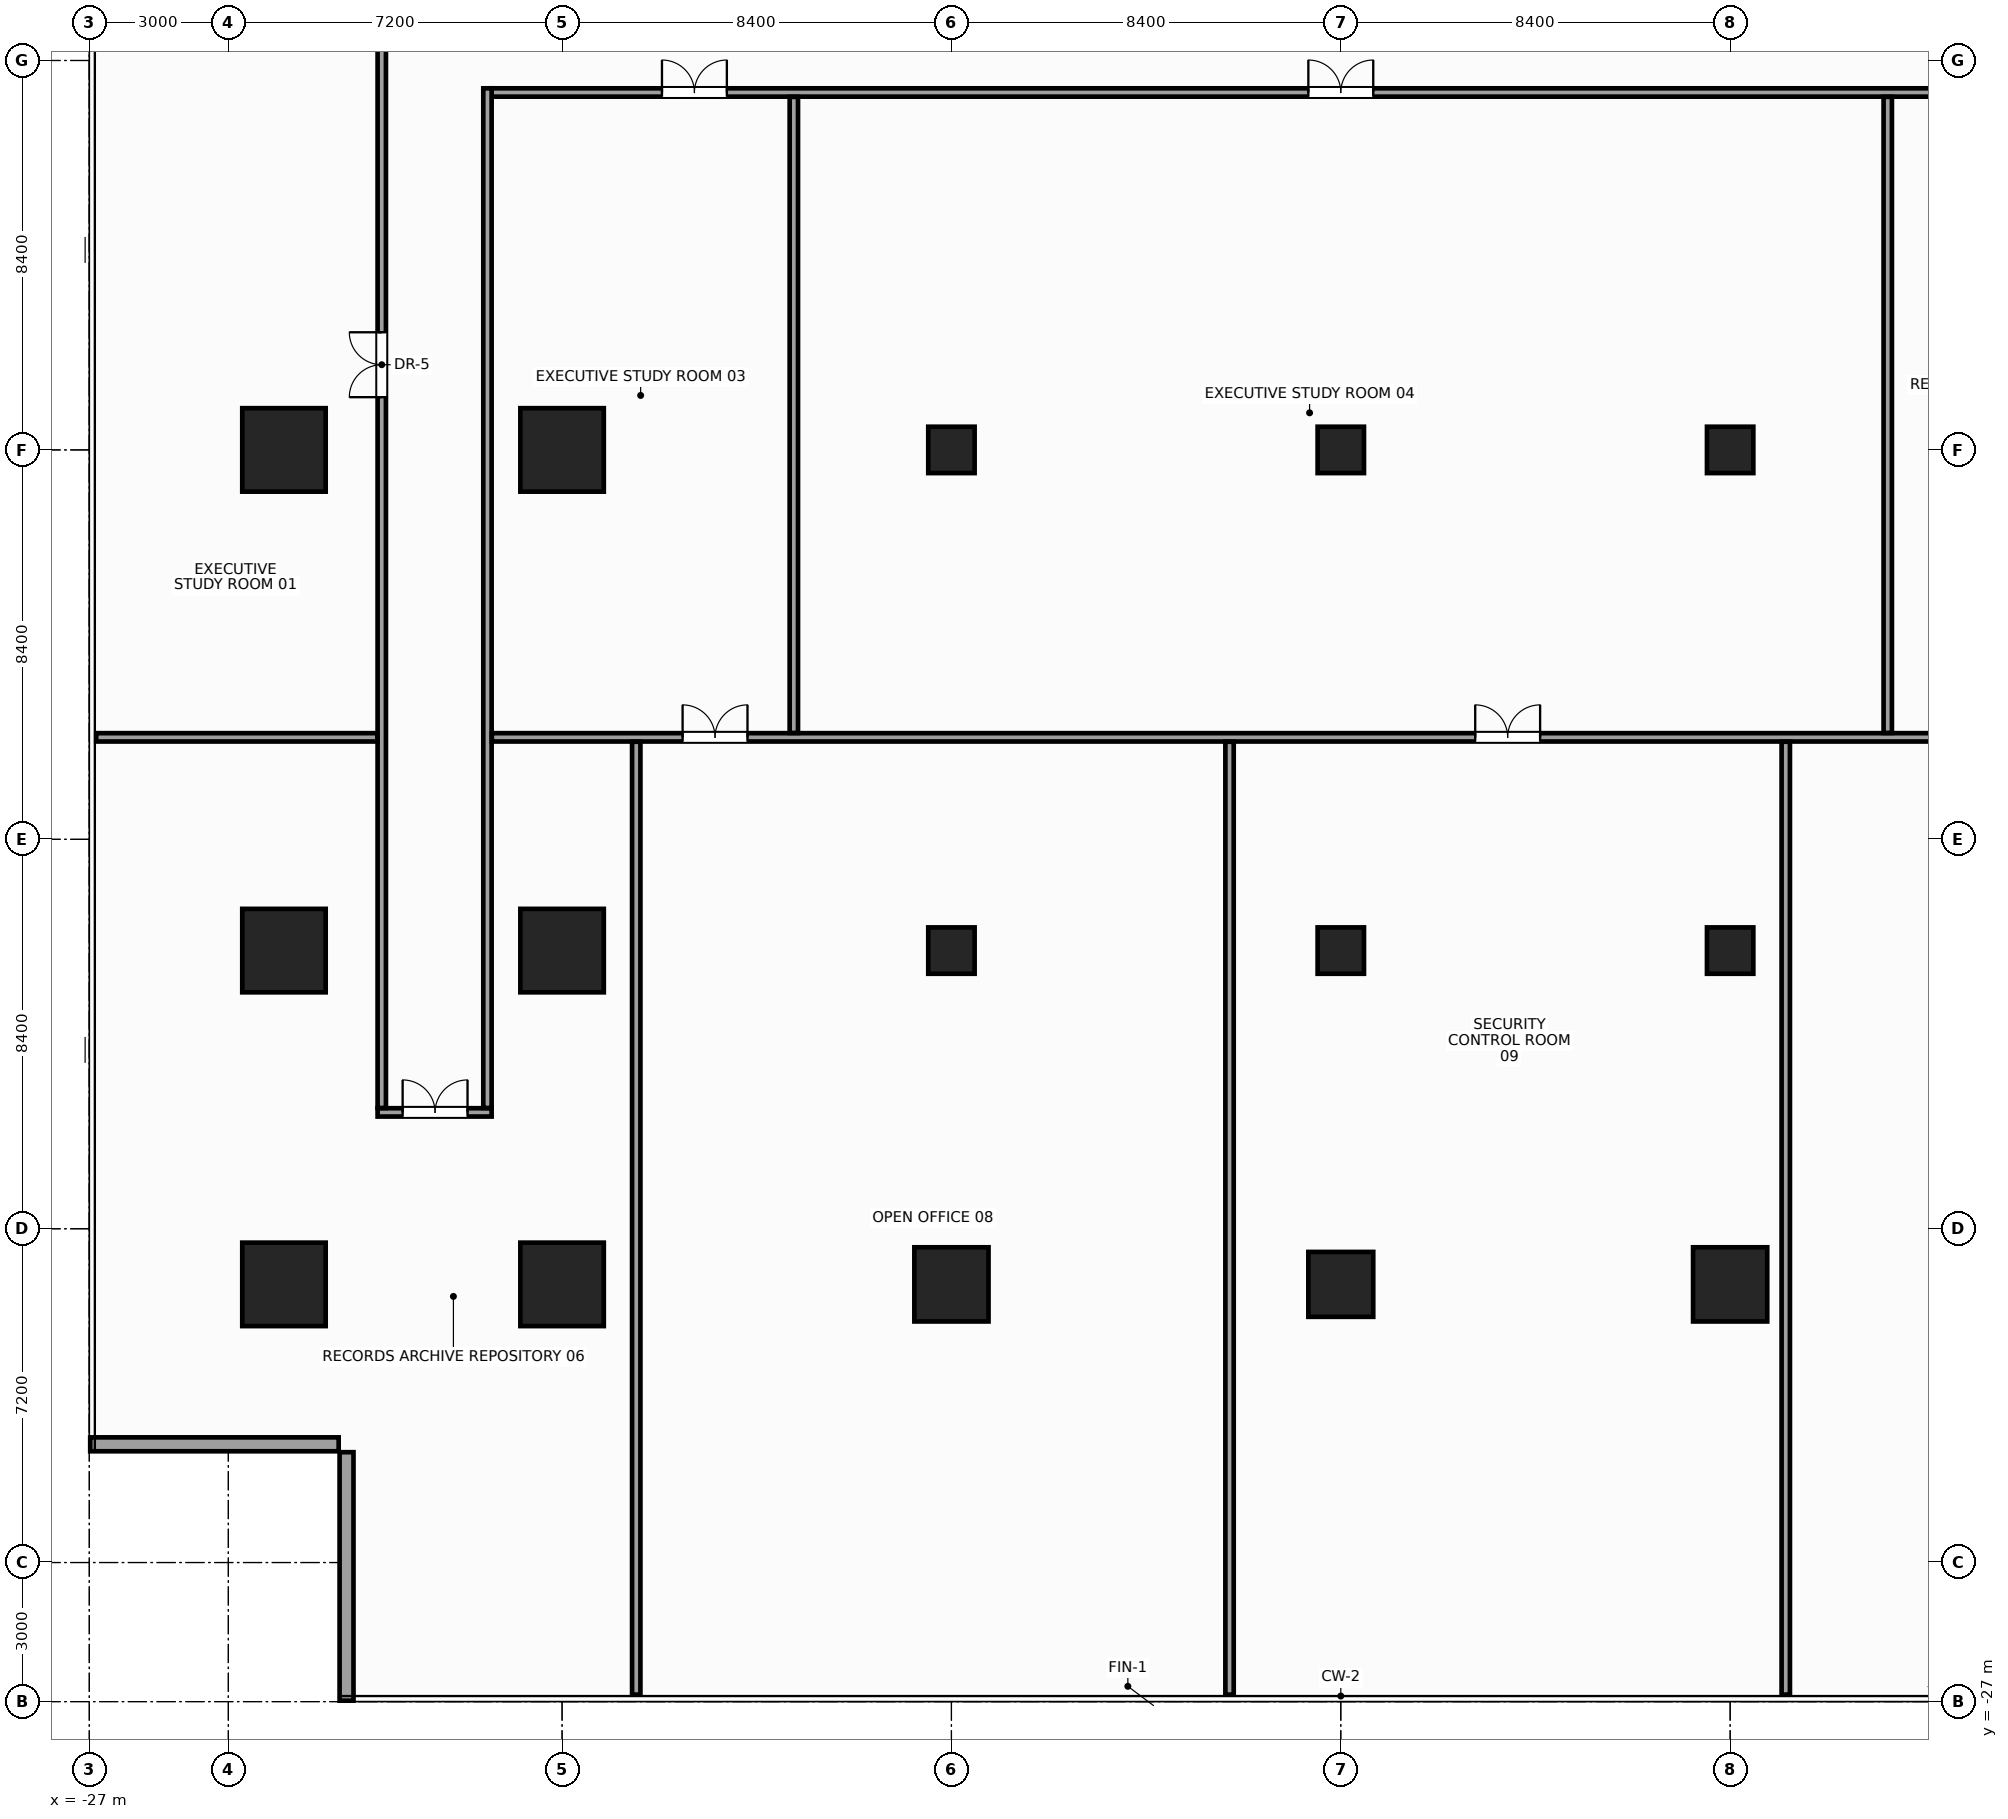
"""IFC4 building model, lengths in metres.
Left out: names, types, materials, properties, quantities, classifications, styles, units other than length and angle.
Written with IfcOpenShell. Run it as: python <this file> out.ifc"""

import sys

from ifc_helpers import new_model, si_unit, direction, frame, frame_2d, origin, origin_2d, place, context, subcontext, project, spatial, rectangle, hollow_rectangle, extrude, source, transform, mapped, element, fill, save


model = new_model("IFC4")
c1 = context("Model", 3, precision=1e-05, world=origin(), true_north=direction((0.0, 1.0)))
c2 = subcontext(c1, "Body", "Model", "MODEL_VIEW")
j1 = project(units=[si_unit("LENGTHUNIT", "METRE"), si_unit("PLANEANGLEUNIT", "RADIAN")], contexts=[c1])
p1 = place(None, origin())
s1 = spatial("IfcSite", under=j1, at=p1, CompositionType="ELEMENT")
p2 = place(p1, origin())
s2 = spatial("IfcBuilding", under=s1, at=p2, CompositionType="ELEMENT")
p3 = place(p2, frame((0.0, 0.0, 63.2)))
s3 = spatial("IfcBuildingStorey", under=s2, at=p3, CompositionType="ELEMENT", Elevation=63.2)
m1 = source(origin(), c2, "Body", "SweptSolid", [
    extrude(rectangle(XDim=1.8, YDim=1.8, at=origin_2d()), origin(), (0.0, 0.0, 1.0), 3.6),
])
for number, where, z_axis, x_axis in (
    (1, (-16.8, -18.0, 0.0), (0.0, 0.0, 1.0), (1.0, 0.0, 0.0)),
    (2, (-16.8, -10.8, 0.0), (0.0, 0.0, 1.0), (1.0, 0.0, 0.0)),
    (3, (-16.8, 0.0, 0.0), (0.0, 0.0, 1.0), (1.0, 0.0, 0.0)),
    (4, (-22.8, -18.0, 0.0), (0.0, 0.0, 1.0), (1.0, 0.0, 0.0)),
    (5, (-22.8, -10.8, 0.0), (0.0, 0.0, 1.0), (1.0, 0.0, 0.0)),
    (6, (-22.8, 0.0, 0.0), (0.0, 0.0, 1.0), (1.0, 0.0, 0.0)),
):
    element("IfcColumn", number, at=place(p3, frame(where, z_axis=z_axis, x_axis=x_axis)), inside=s3, PredefinedType="COLUMN", context=c2, shape_type="MappedRepresentation", body=[
        mapped(m1, transform((0.0, 0.0, 0.0), x_axis=(1.0, 0.0, 0.0), y_axis=(0.0, 1.0, 0.0), z_axis=(0.0, 0.0, 1.0), scale=1.0)),
    ])
m2 = source(origin(), c2, "Body", "SweptSolid", [
    extrude(rectangle(XDim=1.6, YDim=1.6, at=origin_2d()), origin(), (0.0, 0.0, 1.0), 3.6),
])
p4 = place(p3, frame((-8.4, -18.0, 0.0), z_axis=(0.0, 0.0, 1.0), x_axis=(1.0, 0.0, 0.0)))
e7 = element("IfcColumn", 7, at=p4, inside=s3, PredefinedType="COLUMN", context=c2, shape_type="MappedRepresentation", body=[
    mapped(m2, transform((0.0, 0.0, 0.0), x_axis=(1.0, 0.0, 0.0), y_axis=(0.0, 1.0, 0.0), z_axis=(0.0, 0.0, 1.0), scale=1.0)),
])
m3 = source(origin(), c2, "Body", "SweptSolid", [
    extrude(hollow_rectangle(XDim=1.0, YDim=1.0, WallThickness=0.045, at=origin_2d()), origin(), (0.0, 0.0, 1.0), 3.6),
])
for number, where, z_axis, x_axis in (
    (8, (-8.4, 0.0, 0.0), (0.0, 0.0, 1.0), (1.0, 0.0, 0.0)),
    (9, (-8.4, -10.8, 0.0), (0.0, 0.0, 1.0), (1.0, 0.0, 0.0)),
):
    element("IfcColumn", number, at=place(p3, frame(where, z_axis=z_axis, x_axis=x_axis)), inside=s3, PredefinedType="COLUMN", context=c2, shape_type="MappedRepresentation", body=[
        mapped(m3, transform((0.0, 0.0, 0.0), x_axis=(1.0, 0.0, 0.0), y_axis=(0.0, 1.0, 0.0), z_axis=(0.0, 0.0, 1.0), scale=1.0)),
    ])
p5 = place(p3, frame((8.4, -18.0, 0.0), z_axis=(0.0, 0.0, 1.0), x_axis=(1.0, 0.0, 0.0)))
e10 = element("IfcColumn", 10, at=p5, inside=s3, PredefinedType="COLUMN", context=c2, shape_type="MappedRepresentation", body=[
    mapped(m2, transform((0.0, 0.0, 0.0), x_axis=(1.0, 0.0, 0.0), y_axis=(0.0, 1.0, 0.0), z_axis=(0.0, 0.0, 1.0), scale=1.0)),
])
for number, where, z_axis, x_axis in (
    (11, (8.4, 0.0, 0.0), (0.0, 0.0, 1.0), (1.0, 0.0, 0.0)),
    (12, (8.4, -10.8, 0.0), (0.0, 0.0, 1.0), (1.0, 0.0, 0.0)),
):
    element("IfcColumn", number, at=place(p3, frame(where, z_axis=z_axis, x_axis=x_axis)), inside=s3, PredefinedType="COLUMN", context=c2, shape_type="MappedRepresentation", body=[
        mapped(m3, transform((0.0, 0.0, 0.0), x_axis=(1.0, 0.0, 0.0), y_axis=(0.0, 1.0, 0.0), z_axis=(0.0, 0.0, 1.0), scale=1.0)),
    ])
m4 = source(origin(), c2, "Body", "SweptSolid", [
    extrude(rectangle(XDim=1.4, YDim=1.4, at=origin_2d()), origin(), (0.0, 0.0, 1.0), 3.6),
])
p6 = place(p3, frame((0.0, -18.0, 0.0), z_axis=(0.0, 0.0, 1.0), x_axis=(1.0, 0.0, 0.0)))
e13 = element("IfcColumn", 13, at=p6, inside=s3, PredefinedType="COLUMN", context=c2, shape_type="MappedRepresentation", body=[
    mapped(m4, transform((0.0, 0.0, 0.0), x_axis=(1.0, 0.0, 0.0), y_axis=(0.0, 1.0, 0.0), z_axis=(0.0, 0.0, 1.0), scale=1.0)),
])
m5 = source(origin(), c2, "Body", "SweptSolid", [
    extrude(rectangle(XDim=1.0, YDim=1.0, at=origin_2d()), origin(), (0.0, 0.0, 1.0), 3.6),
])
for number, where, z_axis, x_axis in (
    (14, (0.0, -10.8, 0.0), (0.0, 0.0, 1.0), (1.0, 0.0, 0.0)),
    (15, (0.0, 0.0, 0.0), (0.0, 0.0, 1.0), (1.0, 0.0, 0.0)),
):
    element("IfcColumn", number, at=place(p3, frame(where, z_axis=z_axis, x_axis=x_axis)), inside=s3, PredefinedType="COLUMN", context=c2, shape_type="MappedRepresentation", body=[
        mapped(m5, transform((0.0, 0.0, 0.0), x_axis=(1.0, 0.0, 0.0), y_axis=(0.0, 1.0, 0.0), z_axis=(0.0, 0.0, 1.0), scale=1.0)),
    ])
m6 = source(origin(), c2, "Body", "SweptSolid", [
    extrude(rectangle(XDim=5.36, YDim=0.3, at=frame_2d((2.68, 0.0))), origin(), (0.0, 0.0, 1.0), 2.74),
])
for number, where, z_axis, x_axis in (
    (16, (-26.98, -21.45, 0.0), (0.0, 0.0, 1.0), (1.0, 0.0, 0.0)),
    (17, (-21.45, -21.62, 0.0), (0.0, 0.0, 1.0), (0.0, -1.0, 0.0)),
):
    element("IfcWall", number, at=place(p3, frame(where, z_axis=z_axis, x_axis=x_axis)), inside=s3, PredefinedType="STANDARD", context=c2, shape_type="MappedRepresentation", body=[
        mapped(m6, transform((0.0, 0.0, 0.0), x_axis=(1.0, 0.0, 0.0), y_axis=(0.0, 1.0, 0.0), z_axis=(0.0, 0.0, 1.0), scale=1.0)),
    ])
m7 = source(origin(), c2, "Body", "SweptSolid", [
    extrude(rectangle(XDim=36.64, YDim=0.18, at=frame_2d((18.32, 0.0))), origin(), (0.0, 0.0, 1.0), 2.745),
])
p7 = place(p3, frame((-18.32, 7.71, 0.0), z_axis=(0.0, 0.0, 1.0), x_axis=(1.0, 0.0, 0.0)))
e18 = element("IfcWall", 18, at=p7, inside=s3, PredefinedType="PARTITIONING", context=c2, shape_type="MappedRepresentation", body=[
    mapped(m7, transform((0.0, 0.0, 0.0), x_axis=(1.0, 0.0, 0.0), y_axis=(0.0, 1.0, 0.0), z_axis=(0.0, 0.0, 1.0), scale=1.0)),
])
p8 = place(p7, frame((3.675, 0.0, 0.0)))
e19 = element("IfcOpeningElement", 19, at=p8, cuts=e18, PredefinedType="OPENING", context=c2, shape_type="SweptSolid", body=[
    extrude(rectangle(XDim=1.4, YDim=2.2, at=frame_2d((0.7, 1.1))), frame((0.0, 0.102, 0.0), z_axis=(0.0, -1.0, 0.0), x_axis=(1.0, 0.0, 0.0)), (0.0, 0.0, 1.0), 0.204),
])
p9 = place(p7, frame((17.62, 0.0, 0.0)))
e20 = element("IfcOpeningElement", 20, at=p9, cuts=e18, PredefinedType="OPENING", context=c2, shape_type="SweptSolid", body=[
    extrude(rectangle(XDim=1.4, YDim=2.2, at=frame_2d((0.7, 1.1))), frame((0.0, 0.102, 0.0), z_axis=(0.0, -1.0, 0.0), x_axis=(1.0, 0.0, 0.0)), (0.0, 0.0, 1.0), 0.204),
])
p10 = place(p7, frame((32.665, 0.0, 0.0)))
e21 = element("IfcOpeningElement", 21, at=p10, cuts=e18, PredefinedType="OPENING", context=c2, shape_type="SweptSolid", body=[
    extrude(rectangle(XDim=1.4, YDim=2.2, at=frame_2d((0.7, 1.1))), frame((0.0, 0.102, 0.0), z_axis=(0.0, -1.0, 0.0), x_axis=(1.0, 0.0, 0.0)), (0.0, 0.0, 1.0), 0.204),
])
m8 = source(origin(), c2, "Body", "SweptSolid", [
    extrude(rectangle(XDim=2.46, YDim=0.18, at=frame_2d((1.23, 0.0))), origin(), (0.0, 0.0, 1.0), 2.845),
])
p11 = place(p3, frame((-20.78, -14.29, 0.0), z_axis=(0.0, 0.0, 1.0), x_axis=(1.0, 0.0, 0.0)))
e22 = element("IfcWall", 22, at=p11, inside=s3, PredefinedType="PARTITIONING", context=c2, shape_type="MappedRepresentation", body=[
    mapped(m8, transform((0.0, 0.0, 0.0), x_axis=(1.0, 0.0, 0.0), y_axis=(0.0, 1.0, 0.0), z_axis=(0.0, 0.0, 1.0), scale=1.0)),
])
p12 = place(p11, frame((0.54, 0.0, 0.0)))
e23 = element("IfcOpeningElement", 23, at=p12, cuts=e22, PredefinedType="OPENING", context=c2, shape_type="SweptSolid", body=[
    extrude(rectangle(XDim=1.4, YDim=2.2, at=frame_2d((0.7, 1.1))), frame((0.0, 0.102, 0.0), z_axis=(0.0, -1.0, 0.0), x_axis=(1.0, 0.0, 0.0)), (0.0, 0.0, 1.0), 0.204),
])
m9 = source(origin(), c2, "Body", "SweptSolid", [
    extrude(rectangle(XDim=24.1, YDim=0.18, at=frame_2d((12.05, 0.0))), origin(), (0.0, 0.0, 1.0), 2.745),
])
p13 = place(p3, frame((-20.69, -14.195, 0.0), z_axis=(0.0, 0.0, 1.0), x_axis=(0.0, 1.0, 0.0)))
e24 = element("IfcWall", 24, at=p13, inside=s3, PredefinedType="PARTITIONING", context=c2, shape_type="MappedRepresentation", body=[
    mapped(m9, transform((0.0, 0.0, 0.0), x_axis=(1.0, 0.0, 0.0), y_axis=(0.0, 1.0, 0.0), z_axis=(0.0, 0.0, 1.0), scale=1.0)),
])
p14 = place(p13, frame((15.333, 0.0, 0.0)))
e25 = element("IfcOpeningElement", 25, at=p14, cuts=e24, PredefinedType="OPENING", context=c2, shape_type="SweptSolid", body=[
    extrude(rectangle(XDim=1.4, YDim=2.2, at=frame_2d((0.7, 1.1))), frame((0.0, 0.102, 0.0), z_axis=(0.0, -1.0, 0.0), x_axis=(1.0, 0.0, 0.0)), (0.0, 0.0, 1.0), 0.204),
])
m10 = source(origin(), c2, "Body", "SweptSolid", [
    extrude(rectangle(XDim=21.995, YDim=0.18, at=frame_2d((10.998, 0.0))), origin(), (0.0, 0.0, 1.0), 2.745),
])
p15 = place(p3, frame((-18.41, -14.195, 0.0), z_axis=(0.0, 0.0, 1.0), x_axis=(0.0, 1.0, 0.0)))
e26 = element("IfcWall", 26, at=p15, inside=s3, PredefinedType="PARTITIONING", context=c2, shape_type="MappedRepresentation", body=[
    mapped(m10, transform((0.0, 0.0, 0.0), x_axis=(1.0, 0.0, 0.0), y_axis=(0.0, 1.0, 0.0), z_axis=(0.0, 0.0, 1.0), scale=1.0)),
])
m11 = source(origin(), c2, "Body", "SweptSolid", [
    extrude(rectangle(XDim=6.065, YDim=0.18, at=frame_2d((3.033, 0.0))), origin(), (0.0, 0.0, 1.0), 2.745),
])
p16 = place(p3, frame((-26.85, -6.2, 0.0), z_axis=(0.0, 0.0, 1.0), x_axis=(1.0, 0.0, 0.0)))
e27 = element("IfcWall", 27, at=p16, inside=s3, PredefinedType="PARTITIONING", context=c2, shape_type="MappedRepresentation", body=[
    mapped(m11, transform((0.0, 0.0, 0.0), x_axis=(1.0, 0.0, 0.0), y_axis=(0.0, 1.0, 0.0), z_axis=(0.0, 0.0, 1.0), scale=1.0)),
])
m12 = source(origin(), c2, "Body", "SweptSolid", [
    extrude(rectangle(XDim=36.63, YDim=0.18, at=frame_2d((18.315, 0.0))), origin(), (0.0, 0.0, 1.0), 2.745),
])
p17 = place(p3, frame((-18.315, -6.2, 0.0), z_axis=(0.0, 0.0, 1.0), x_axis=(1.0, 0.0, 0.0)))
e28 = element("IfcWall", 28, at=p17, inside=s3, PredefinedType="PARTITIONING", context=c2, shape_type="MappedRepresentation", body=[
    mapped(m12, transform((0.0, 0.0, 0.0), x_axis=(1.0, 0.0, 0.0), y_axis=(0.0, 1.0, 0.0), z_axis=(0.0, 0.0, 1.0), scale=1.0)),
])
p18 = place(p17, frame((4.115, 0.0, 0.0)))
e29 = element("IfcOpeningElement", 29, at=p18, cuts=e28, PredefinedType="OPENING", context=c2, shape_type="SweptSolid", body=[
    extrude(rectangle(XDim=1.4, YDim=2.2, at=frame_2d((0.7, 1.1))), frame((0.0, 0.102, 0.0), z_axis=(0.0, -1.0, 0.0), x_axis=(1.0, 0.0, 0.0)), (0.0, 0.0, 1.0), 0.204),
])
p19 = place(p17, frame((21.215, 0.0, 0.0)))
e30 = element("IfcOpeningElement", 30, at=p19, cuts=e28, PredefinedType="OPENING", context=c2, shape_type="SweptSolid", body=[
    extrude(rectangle(XDim=1.4, YDim=2.2, at=frame_2d((0.7, 1.1))), frame((0.0, 0.102, 0.0), z_axis=(0.0, -1.0, 0.0), x_axis=(1.0, 0.0, 0.0)), (0.0, 0.0, 1.0), 0.204),
])
m13 = source(origin(), c2, "Body", "SweptSolid", [
    extrude(rectangle(XDim=13.72, YDim=0.18, at=frame_2d((6.86, 0.0))), origin(), (0.0, 0.0, 1.0), 2.645),
])
for number, where, z_axis, x_axis in (
    (31, (-11.8, -6.105, 0.0), (0.0, 0.0, 1.0), (0.0, 1.0, 0.0)),
    (32, (11.8, -6.105, 0.0), (0.0, 0.0, 1.0), (0.0, 1.0, 0.0)),
):
    element("IfcWall", number, at=place(p3, frame(where, z_axis=z_axis, x_axis=x_axis)), inside=s3, PredefinedType="PARTITIONING", context=c2, shape_type="MappedRepresentation", body=[
        mapped(m13, transform((0.0, 0.0, 0.0), x_axis=(1.0, 0.0, 0.0), y_axis=(0.0, 1.0, 0.0), z_axis=(0.0, 0.0, 1.0), scale=1.0)),
    ])
m14 = source(origin(), c2, "Body", "SweptSolid", [
    extrude(rectangle(XDim=20.555, YDim=0.18, at=frame_2d((10.278, 0.0))), origin(), (0.0, 0.0, 1.0), 2.745),
])
for number, where, z_axis, x_axis in (
    (33, (-15.2, -26.85, 0.0), (0.0, 0.0, 1.0), (0.0, 1.0, 0.0)),
    (34, (-2.4, -26.85, 0.0), (0.0, 0.0, 1.0), (0.0, 1.0, 0.0)),
    (35, (9.6, -26.85, 0.0), (0.0, 0.0, 1.0), (0.0, 1.0, 0.0)),
):
    element("IfcWall", number, at=place(p3, frame(where, z_axis=z_axis, x_axis=x_axis)), inside=s3, PredefinedType="PARTITIONING", context=c2, shape_type="MappedRepresentation", body=[
        mapped(m14, transform((0.0, 0.0, 0.0), x_axis=(1.0, 0.0, 0.0), y_axis=(0.0, 1.0, 0.0), z_axis=(0.0, 0.0, 1.0), scale=1.0)),
    ])
m15 = source(origin(), c2, "Body", "SweptSolid", [
    extrude(rectangle(XDim=1.4, YDim=2.2, at=frame_2d((0.7, 1.1))), frame((0.0, 0.025, 0.0), z_axis=(0.0, -1.0, 0.0), x_axis=(1.0, 0.0, 0.0)), (0.0, 0.0, 1.0), 0.05),
])
p20 = place(p14, origin())
e36 = element("IfcDoor", 36, at=p20, inside=s3, OperationType="DOUBLE_DOOR_SINGLE_SWING", PredefinedType="DOOR", context=c2, shape_type="MappedRepresentation", body=[
    mapped(m15, transform((0.0, 0.0, 0.0), x_axis=(1.0, 0.0, 0.0), y_axis=(0.0, 1.0, 0.0), z_axis=(0.0, 0.0, 1.0), scale=1.0)),
])
fill(e25, e36)
p21 = place(p8, origin())
e37 = element("IfcDoor", 37, at=p21, inside=s3, OperationType="DOUBLE_DOOR_SINGLE_SWING", PredefinedType="DOOR", context=c2, shape_type="MappedRepresentation", body=[
    mapped(m15, transform((0.0, 0.0, 0.0), x_axis=(1.0, 0.0, 0.0), y_axis=(0.0, 1.0, 0.0), z_axis=(0.0, 0.0, 1.0), scale=1.0)),
])
fill(e19, e37)
p22 = place(p9, origin())
e38 = element("IfcDoor", 38, at=p22, inside=s3, OperationType="DOUBLE_DOOR_SINGLE_SWING", PredefinedType="DOOR", context=c2, shape_type="MappedRepresentation", body=[
    mapped(m15, transform((0.0, 0.0, 0.0), x_axis=(1.0, 0.0, 0.0), y_axis=(0.0, 1.0, 0.0), z_axis=(0.0, 0.0, 1.0), scale=1.0)),
])
fill(e20, e38)
p23 = place(p12, origin())
e39 = element("IfcDoor", 39, at=p23, inside=s3, OperationType="DOUBLE_DOOR_SINGLE_SWING", PredefinedType="DOOR", context=c2, shape_type="MappedRepresentation", body=[
    mapped(m15, transform((0.0, 0.0, 0.0), x_axis=(1.0, 0.0, 0.0), y_axis=(0.0, 1.0, 0.0), z_axis=(0.0, 0.0, 1.0), scale=1.0)),
])
fill(e23, e39)
p24 = place(p18, origin())
e40 = element("IfcDoor", 40, at=p24, inside=s3, OperationType="DOUBLE_DOOR_SINGLE_SWING", PredefinedType="DOOR", context=c2, shape_type="MappedRepresentation", body=[
    mapped(m15, transform((0.0, 0.0, 0.0), x_axis=(1.0, 0.0, 0.0), y_axis=(0.0, 1.0, 0.0), z_axis=(0.0, 0.0, 1.0), scale=1.0)),
])
fill(e29, e40)
p25 = place(p19, origin())
e41 = element("IfcDoor", 41, at=p25, inside=s3, OperationType="DOUBLE_DOOR_SINGLE_SWING", PredefinedType="DOOR", context=c2, shape_type="MappedRepresentation", body=[
    mapped(m15, transform((0.0, 0.0, 0.0), x_axis=(1.0, 0.0, 0.0), y_axis=(0.0, 1.0, 0.0), z_axis=(0.0, 0.0, 1.0), scale=1.0)),
])
fill(e30, e41)
save(model, sys.argv[1])
